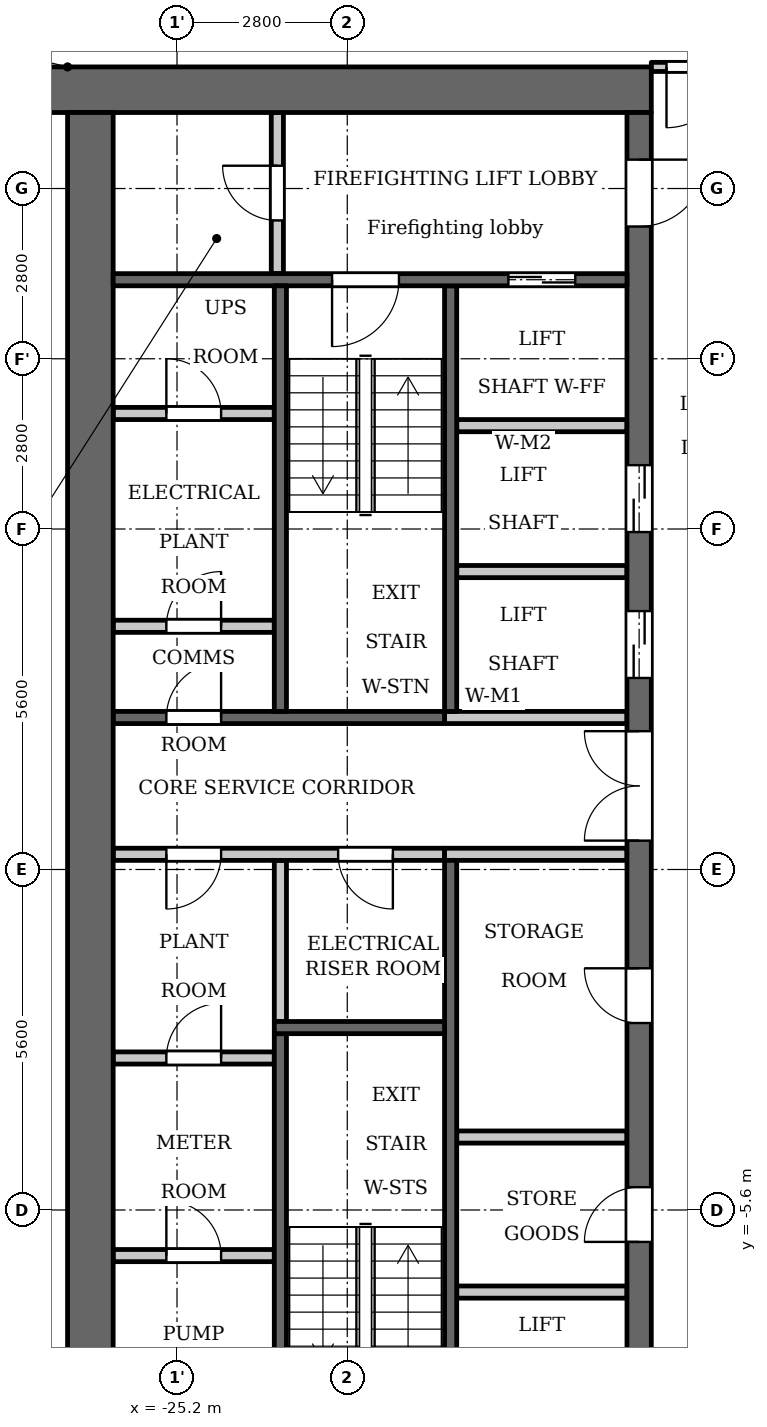
"""IFC4 building model, lengths in metres.
Left out: names, types, materials, properties, quantities, classifications, styles, units other than length and angle.
Written with IfcOpenShell. Run it as: python <this file> out.ifc"""

import sys

from ifc_helpers import new_model, si_unit, direction, frame, frame_2d, origin, place, context, subcontext, project, spatial, rectangle, extrude, element, fill, save


model = new_model("IFC4")
c1 = context("Model", 3, precision=1e-05, world=origin(), true_north=direction((0.0, 1.0)))
c2 = subcontext(c1, "Body", "Model", "MODEL_VIEW")
j1 = project(units=[si_unit("LENGTHUNIT", "METRE"), si_unit("PLANEANGLEUNIT", "RADIAN")], contexts=[c1])
p1 = place(None, origin())
s1 = spatial("IfcSite", under=j1, at=p1, CompositionType="ELEMENT")
p2 = place(p1, origin())
s2 = spatial("IfcBuilding", under=s1, at=p2, CompositionType="ELEMENT")
p3 = place(p2, frame((0.0, 0.0, 150.1)))
s3 = spatial("IfcBuildingStorey", under=s2, at=p3, CompositionType="ELEMENT", Elevation=150.1)
p4 = place(p3, frame((-23.5, -2.5, 0.0), z_axis=(0.0, 0.0, 1.0), x_axis=(0.0, 1.0, 0.0)))
e1 = element("IfcWall", 1, at=p4, inside=s3, PredefinedType="PARTITIONING", context=c2, shape_type="SweptSolid", body=[
    extrude(rectangle(XDim=2.65, YDim=0.2, at=frame_2d((1.325, 0.0))), origin(), (0.0, 0.0, 1.0), 3.2),
])
p5 = place(p3, frame((-20.7, 2.6, 0.0), z_axis=(0.0, 0.0, 1.0), x_axis=(0.0, 1.0, 0.0)))
e2 = element("IfcWall", 2, at=p5, inside=s3, PredefinedType="SHEAR", context=c2, shape_type="SweptSolid", body=[
    extrude(rectangle(XDim=7.0, YDim=0.2, at=frame_2d((3.5, 0.0))), origin(), (0.0, 0.0, 1.0), 3.2),
])
p6 = place(p3, frame((-20.7, -9.6, 0.0), z_axis=(0.0, 0.0, 1.0), x_axis=(0.0, 1.0, 0.0)))
e3 = element("IfcWall", 3, at=p6, inside=s3, PredefinedType="SHEAR", context=c2, shape_type="SweptSolid", body=[
    extrude(rectangle(XDim=9.75, YDim=0.2, at=frame_2d((4.875, 0.0))), origin(), (0.0, 0.0, 1.0), 3.2),
])
p7 = place(p3, frame((-20.8, 2.5, 0.0), z_axis=(0.0, 0.0, 1.0), x_axis=(-1.0, 0.0, 0.0)))
e4 = element("IfcWall", 4, at=p7, inside=s3, PredefinedType="SHEAR", context=c2, shape_type="SweptSolid", body=[
    extrude(rectangle(XDim=5.45, YDim=0.2, at=frame_2d((2.725, 0.0))), origin(), (0.0, 0.0, 1.0), 3.2),
])
p8 = place(p7, frame((3.675, 0.0, 0.0)))
e5 = element("IfcOpeningElement", 5, at=p8, cuts=e4, PredefinedType="OPENING", context=c2, shape_type="SweptSolid", body=[
    extrude(rectangle(XDim=0.9, YDim=2.1, at=frame_2d((0.45, 1.05))), frame((0.0, 0.11, 0.0), z_axis=(0.0, -1.0, 0.0), x_axis=(1.0, 0.0, 0.0)), (0.0, 0.0, 1.0), 0.22),
])
p9 = place(p3, frame((-20.8, 0.25, 0.0), z_axis=(0.0, 0.0, 1.0), x_axis=(-1.0, 0.0, 0.0)))
e6 = element("IfcWall", 6, at=p9, inside=s3, PredefinedType="PARTITIONING", context=c2, shape_type="SweptSolid", body=[
    extrude(rectangle(XDim=5.45, YDim=0.2, at=frame_2d((2.725, 0.0))), origin(), (0.0, 0.0, 1.0), 3.2),
])
p10 = place(p9, frame((0.85, 0.0, 0.0)))
e7 = element("IfcOpeningElement", 7, at=p10, cuts=e6, PredefinedType="OPENING", context=c2, shape_type="SweptSolid", body=[
    extrude(rectangle(XDim=0.9, YDim=2.1, at=frame_2d((0.45, 1.05))), frame((0.0, 0.11, 0.0), z_axis=(0.0, -1.0, 0.0), x_axis=(1.0, 0.0, 0.0)), (0.0, 0.0, 1.0), 0.22),
])
p11 = place(p9, frame((3.675, 0.0, 0.0)))
e8 = element("IfcOpeningElement", 8, at=p11, cuts=e6, PredefinedType="OPENING", context=c2, shape_type="SweptSolid", body=[
    extrude(rectangle(XDim=0.9, YDim=2.1, at=frame_2d((0.45, 1.05))), frame((0.0, 0.11, 0.0), z_axis=(0.0, -1.0, 0.0), x_axis=(1.0, 0.0, 0.0)), (0.0, 0.0, 1.0), 0.22),
])
p12 = place(p3, frame((-17.4, 12.825, 0.0), z_axis=(0.0, 0.0, 1.0), x_axis=(-1.0, 0.0, 0.0)))
e9 = element("IfcWall", 9, at=p12, inside=s3, PredefinedType="SHEAR", context=c2, shape_type="SweptSolid", body=[
    extrude(rectangle(XDim=10.4, YDim=0.75, at=frame_2d((5.2, 0.0))), origin(), (0.0, 0.0, 1.0), 3.2),
])
p13 = place(p3, frame((-17.8, -4.4, 0.0), z_axis=(0.0, 0.0, 1.0), x_axis=(-1.0, 0.0, 0.0)))
e10 = element("IfcWall", 10, at=p13, inside=s3, PredefinedType="PARTITIONING", context=c2, shape_type="SweptSolid", body=[
    extrude(rectangle(XDim=2.8, YDim=0.2, at=frame_2d((1.4, 0.0))), origin(), (0.0, 0.0, 1.0), 3.2),
])
p14 = place(p3, frame((-17.6, -12.45, 0.0), z_axis=(0.0, 0.0, 1.0), x_axis=(0.0, 1.0, 0.0)))
e11 = element("IfcWall", 11, at=p14, inside=s3, PredefinedType="SHEAR", context=c2, shape_type="SweptSolid", body=[
    extrude(rectangle(XDim=24.9, YDim=0.4, at=frame_2d((12.45, 0.0))), origin(), (0.0, 0.0, 1.0), 3.2),
])
p15 = place(p14, frame((6.325, 0.0, 0.0)))
e12 = element("IfcOpeningElement", 12, at=p15, cuts=e11, PredefinedType="OPENING", context=c2, shape_type="SweptSolid", body=[
    extrude(rectangle(XDim=0.9, YDim=2.1, at=frame_2d((0.45, 1.05))), frame((0.0, 0.21, 0.0), z_axis=(0.0, -1.0, 0.0), x_axis=(1.0, 0.0, 0.0)), (0.0, 0.0, 1.0), 0.42),
])
p16 = place(p14, frame((9.925, 0.0, 0.0)))
e13 = element("IfcOpeningElement", 13, at=p16, cuts=e11, PredefinedType="OPENING", context=c2, shape_type="SweptSolid", body=[
    extrude(rectangle(XDim=0.9, YDim=2.1, at=frame_2d((0.45, 1.05))), frame((0.0, 0.21, 0.0), z_axis=(0.0, -1.0, 0.0), x_axis=(1.0, 0.0, 0.0)), (0.0, 0.0, 1.0), 0.42),
])
p17 = place(p14, frame((15.6, 0.0, 0.0)))
e14 = element("IfcOpeningElement", 14, at=p17, cuts=e11, PredefinedType="OPENING", context=c2, shape_type="SweptSolid", body=[
    extrude(rectangle(XDim=1.1, YDim=2.1, at=frame_2d((0.55, 1.05))), frame((0.0, 0.21, 0.0), z_axis=(0.0, -1.0, 0.0), x_axis=(1.0, 0.0, 0.0)), (0.0, 0.0, 1.0), 0.42),
])
p18 = place(p14, frame((18.0, 0.0, 0.0)))
e15 = element("IfcOpeningElement", 15, at=p18, cuts=e11, PredefinedType="OPENING", context=c2, shape_type="SweptSolid", body=[
    extrude(rectangle(XDim=1.1, YDim=2.1, at=frame_2d((0.55, 1.05))), frame((0.0, 0.21, 0.0), z_axis=(0.0, -1.0, 0.0), x_axis=(1.0, 0.0, 0.0)), (0.0, 0.0, 1.0), 0.42),
])
p19 = place(p14, frame((23.025, 0.0, 0.0)))
e16 = element("IfcOpeningElement", 16, at=p19, cuts=e11, PredefinedType="OPENING", context=c2, shape_type="SweptSolid", body=[
    extrude(rectangle(XDim=1.1, YDim=2.1, at=frame_2d((0.55, 1.05))), frame((0.0, 0.21, 0.0), z_axis=(0.0, -1.0, 0.0), x_axis=(1.0, 0.0, 0.0)), (0.0, 0.0, 1.0), 0.42),
])
p20 = place(p14, frame((0.775, 0.0, 0.0)))
e17 = element("IfcOpeningElement", 17, at=p20, cuts=e11, PredefinedType="OPENING", context=c2, shape_type="SweptSolid", body=[
    extrude(rectangle(XDim=1.1, YDim=2.1, at=frame_2d((0.55, 1.05))), frame((0.0, 0.21, 0.0), z_axis=(0.0, -1.0, 0.0), x_axis=(1.0, 0.0, 0.0)), (0.0, 0.0, 1.0), 0.42),
])
p21 = place(p14, frame((12.925, 0.0, 0.0)))
e18 = element("IfcOpeningElement", 18, at=p21, cuts=e11, PredefinedType="OPENING", context=c2, shape_type="SweptSolid", body=[
    extrude(rectangle(XDim=1.8, YDim=2.1, at=frame_2d((0.9, 1.05))), frame((0.0, 0.21, 0.0), z_axis=(0.0, -1.0, 0.0), x_axis=(1.0, 0.0, 0.0)), (0.0, 0.0, 1.0), 0.42),
])
p22 = place(p3, frame((-26.625, -12.45, 0.0), z_axis=(0.0, 0.0, 1.0), x_axis=(0.0, 1.0, 0.0)))
e19 = element("IfcWall", 19, at=p22, inside=s3, PredefinedType="SHEAR", context=c2, shape_type="SweptSolid", body=[
    extrude(rectangle(XDim=24.9, YDim=0.75, at=frame_2d((12.45, 0.0))), origin(), (0.0, 0.0, 1.0), 3.2),
])
p23 = place(p3, frame((-23.55, 9.8, 0.0), z_axis=(0.0, 0.0, 1.0), x_axis=(0.0, 1.0, 0.0)))
e20 = element("IfcWall", 20, at=p23, inside=s3, PredefinedType="PARTITIONING", context=c2, shape_type="SweptSolid", body=[
    extrude(rectangle(XDim=2.65, YDim=0.2, at=frame_2d((1.325, 0.0))), origin(), (0.0, 0.0, 1.0), 3.2),
])
p24 = place(p23, frame((0.875, 0.0, 0.0)))
e21 = element("IfcOpeningElement", 21, at=p24, cuts=e20, PredefinedType="OPENING", context=c2, shape_type="SweptSolid", body=[
    extrude(rectangle(XDim=0.9, YDim=2.1, at=frame_2d((0.45, 1.05))), frame((0.0, 0.11, 0.0), z_axis=(0.0, -1.0, 0.0), x_axis=(1.0, 0.0, 0.0)), (0.0, 0.0, 1.0), 0.22),
])
p25 = place(p3, frame((-23.6, -6.35, 0.0), z_axis=(0.0, 0.0, 1.0), x_axis=(-1.0, 0.0, 0.0)))
e22 = element("IfcWall", 22, at=p25, inside=s3, PredefinedType="PARTITIONING", context=c2, shape_type="SweptSolid", body=[
    extrude(rectangle(XDim=2.65, YDim=0.2, at=frame_2d((1.325, 0.0))), origin(), (0.0, 0.0, 1.0), 3.2),
])
p26 = place(p25, frame((0.875, 0.0, 0.0)))
e23 = element("IfcOpeningElement", 23, at=p26, cuts=e22, PredefinedType="OPENING", context=c2, shape_type="SweptSolid", body=[
    extrude(rectangle(XDim=0.9, YDim=2.1, at=frame_2d((0.45, 1.05))), frame((0.0, 0.11, 0.0), z_axis=(0.0, -1.0, 0.0), x_axis=(1.0, 0.0, 0.0)), (0.0, 0.0, 1.0), 0.22),
])
p27 = place(p3, frame((-23.6, -3.1, 0.0), z_axis=(0.0, 0.0, 1.0), x_axis=(-1.0, 0.0, 0.0)))
e24 = element("IfcWall", 24, at=p27, inside=s3, PredefinedType="PARTITIONING", context=c2, shape_type="SweptSolid", body=[
    extrude(rectangle(XDim=2.65, YDim=0.2, at=frame_2d((1.325, 0.0))), origin(), (0.0, 0.0, 1.0), 3.2),
])
p28 = place(p27, frame((0.875, 0.0, 0.0)))
e25 = element("IfcOpeningElement", 25, at=p28, cuts=e24, PredefinedType="OPENING", context=c2, shape_type="SweptSolid", body=[
    extrude(rectangle(XDim=0.9, YDim=2.1, at=frame_2d((0.45, 1.05))), frame((0.0, 0.11, 0.0), z_axis=(0.0, -1.0, 0.0), x_axis=(1.0, 0.0, 0.0)), (0.0, 0.0, 1.0), 0.22),
])
p29 = place(p3, frame((-23.6, 4.0, 0.0), z_axis=(0.0, 0.0, 1.0), x_axis=(-1.0, 0.0, 0.0)))
e26 = element("IfcWall", 26, at=p29, inside=s3, PredefinedType="PARTITIONING", context=c2, shape_type="SweptSolid", body=[
    extrude(rectangle(XDim=2.65, YDim=0.2, at=frame_2d((1.325, 0.0))), origin(), (0.0, 0.0, 1.0), 3.2),
])
p30 = place(p29, frame((0.875, 0.0, 0.0)))
e27 = element("IfcOpeningElement", 27, at=p30, cuts=e26, PredefinedType="OPENING", context=c2, shape_type="SweptSolid", body=[
    extrude(rectangle(XDim=0.9, YDim=2.1, at=frame_2d((0.45, 1.05))), frame((0.0, 0.11, 0.0), z_axis=(0.0, -1.0, 0.0), x_axis=(1.0, 0.0, 0.0)), (0.0, 0.0, 1.0), 0.22),
])
p31 = place(p3, frame((-23.6, 7.5, 0.0), z_axis=(0.0, 0.0, 1.0), x_axis=(-1.0, 0.0, 0.0)))
e28 = element("IfcWall", 28, at=p31, inside=s3, PredefinedType="PARTITIONING", context=c2, shape_type="SweptSolid", body=[
    extrude(rectangle(XDim=2.65, YDim=0.2, at=frame_2d((1.325, 0.0))), origin(), (0.0, 0.0, 1.0), 3.2),
])
p32 = place(p31, frame((0.875, 0.0, 0.0)))
e29 = element("IfcOpeningElement", 29, at=p32, cuts=e28, PredefinedType="OPENING", context=c2, shape_type="SweptSolid", body=[
    extrude(rectangle(XDim=0.9, YDim=2.1, at=frame_2d((0.45, 1.05))), frame((0.0, 0.11, 0.0), z_axis=(0.0, -1.0, 0.0), x_axis=(1.0, 0.0, 0.0)), (0.0, 0.0, 1.0), 0.22),
])
p33 = place(p3, frame((-17.8, -6.95, 0.0), z_axis=(0.0, 0.0, 1.0), x_axis=(-1.0, 0.0, 0.0)))
e30 = element("IfcWall", 30, at=p33, inside=s3, PredefinedType="PARTITIONING", context=c2, shape_type="SweptSolid", body=[
    extrude(rectangle(XDim=2.8, YDim=0.2, at=frame_2d((1.4, 0.0))), origin(), (0.0, 0.0, 1.0), 3.2),
])
for number, where, z_axis, x_axis in (
    (31, (-17.8, 0.25, 0.0), (0.0, 0.0, 1.0), (-1.0, 0.0, 0.0)),
    (32, (-17.8, 2.5, 0.0), (0.0, 0.0, 1.0), (-1.0, 0.0, 0.0)),
):
    element("IfcWall", number, at=place(p3, frame(where, z_axis=z_axis, x_axis=x_axis)), inside=s3, PredefinedType="PARTITIONING", context=c2, shape_type="SweptSolid", body=[
        extrude(rectangle(XDim=3.0, YDim=0.2, at=frame_2d((1.5, 0.0))), origin(), (0.0, 0.0, 1.0), 3.2),
    ])
for number, where, z_axis, x_axis in (
    (33, (-17.8, 4.9, 0.0), (0.0, 0.0, 1.0), (-1.0, 0.0, 0.0)),
    (34, (-17.8, 7.3, 0.0), (0.0, 0.0, 1.0), (-1.0, 0.0, 0.0)),
):
    element("IfcWall", number, at=place(p3, frame(where, z_axis=z_axis, x_axis=x_axis)), inside=s3, PredefinedType="PARTITIONING", context=c2, shape_type="SweptSolid", body=[
        extrude(rectangle(XDim=2.8, YDim=0.2, at=frame_2d((1.4, 0.0))), origin(), (0.0, 0.0, 1.0), 3.2),
    ])
p34 = place(p3, frame((-17.8, 9.7, 0.0), z_axis=(0.0, 0.0, 1.0), x_axis=(-1.0, 0.0, 0.0)))
e35 = element("IfcWall", 35, at=p34, inside=s3, PredefinedType="SHEAR", context=c2, shape_type="SweptSolid", body=[
    extrude(rectangle(XDim=8.45, YDim=0.2, at=frame_2d((4.225, 0.0))), origin(), (0.0, 0.0, 1.0), 3.2),
])
p35 = place(p34, frame((0.85, 0.0, 0.0)))
e36 = element("IfcOpeningElement", 36, at=p35, cuts=e35, PredefinedType="OPENING", context=c2, shape_type="SweptSolid", body=[
    extrude(rectangle(XDim=1.1, YDim=2.1, at=frame_2d((0.55, 1.05))), frame((0.0, 0.11, 0.0), z_axis=(0.0, -1.0, 0.0), x_axis=(1.0, 0.0, 0.0)), (0.0, 0.0, 1.0), 0.22),
])
p36 = place(p34, frame((3.75, 0.0, 0.0)))
e37 = element("IfcOpeningElement", 37, at=p36, cuts=e35, PredefinedType="OPENING", context=c2, shape_type="SweptSolid", body=[
    extrude(rectangle(XDim=1.1, YDim=2.1, at=frame_2d((0.55, 1.05))), frame((0.0, 0.11, 0.0), z_axis=(0.0, -1.0, 0.0), x_axis=(1.0, 0.0, 0.0)), (0.0, 0.0, 1.0), 0.22),
])
p37 = place(p3, frame((-23.5, 2.6, 0.0), z_axis=(0.0, 0.0, 1.0), x_axis=(0.0, 1.0, 0.0)))
e38 = element("IfcWall", 38, at=p37, inside=s3, PredefinedType="SHEAR", context=c2, shape_type="SweptSolid", body=[
    extrude(rectangle(XDim=7.0, YDim=0.2, at=frame_2d((3.5, 0.0))), origin(), (0.0, 0.0, 1.0), 3.2),
])
p38 = place(p3, frame((-23.5, -9.6, 0.0), z_axis=(0.0, 0.0, 1.0), x_axis=(0.0, 1.0, 0.0)))
e39 = element("IfcWall", 39, at=p38, inside=s3, PredefinedType="SHEAR", context=c2, shape_type="SweptSolid", body=[
    extrude(rectangle(XDim=6.9, YDim=0.2, at=frame_2d((3.45, 0.0))), origin(), (0.0, 0.0, 1.0), 3.2),
])
p39 = place(p3, frame((-20.8, -2.6, 0.0), z_axis=(0.0, 0.0, 1.0), x_axis=(-1.0, 0.0, 0.0)))
e40 = element("IfcWall", 40, at=p39, inside=s3, PredefinedType="SHEAR", context=c2, shape_type="SweptSolid", body=[
    extrude(rectangle(XDim=2.8, YDim=0.2, at=frame_2d((1.4, 0.0))), origin(), (0.0, 0.0, 1.0), 3.2),
])
p40 = place(p3, frame((-17.4, 13.2, 0.0), z_axis=(0.0, 0.0, 1.0), x_axis=(1.0, 0.0, 0.0)))
e41 = element("IfcWall", 41, at=p40, inside=s3, PredefinedType="PARTITIONING", context=c2, shape_type="SweptSolid", body=[
    extrude(rectangle(XDim=34.8, YDim=0.15, at=frame_2d((17.4, 0.0))), origin(), (0.0, 0.0, 1.0), 3.2),
])
p41 = place(p40, frame((0.25, 0.0, 0.0)))
e42 = element("IfcOpeningElement", 42, at=p41, cuts=e41, PredefinedType="OPENING", context=c2, shape_type="SweptSolid", body=[
    extrude(rectangle(XDim=1.0, YDim=2.1, at=frame_2d((0.5, 1.05))), frame((0.0, 0.085, 0.0), z_axis=(0.0, -1.0, 0.0), x_axis=(1.0, 0.0, 0.0)), (0.0, 0.0, 1.0), 0.17),
])
p42 = place(p40, frame((33.65, 0.0, 0.0)))
e43 = element("IfcOpeningElement", 43, at=p42, cuts=e41, PredefinedType="OPENING", context=c2, shape_type="SweptSolid", body=[
    extrude(rectangle(XDim=1.0, YDim=2.1, at=frame_2d((0.5, 1.05))), frame((0.0, 0.085, 0.0), z_axis=(0.0, -1.0, 0.0), x_axis=(1.0, 0.0, 0.0)), (0.0, 0.0, 1.0), 0.17),
])
p43 = place(p40, frame((13.75, 0.0, 0.0)))
e44 = element("IfcOpeningElement", 44, at=p43, cuts=e41, PredefinedType="OPENING", context=c2, shape_type="SweptSolid", body=[
    extrude(rectangle(XDim=1.0, YDim=2.1, at=frame_2d((0.5, 1.05))), frame((0.0, 0.085, 0.0), z_axis=(0.0, -1.0, 0.0), x_axis=(1.0, 0.0, 0.0)), (0.0, 0.0, 1.0), 0.17),
])
p44 = place(p15, origin())
e45 = element("IfcDoor", 45, at=p44, inside=s3, OperationType="SINGLE_SWING_RIGHT", PredefinedType="DOOR", context=c2, shape_type="SweptSolid", body=[
    extrude(rectangle(XDim=0.9, YDim=2.1, at=frame_2d((0.45, 1.05))), frame((0.0, 0.025, 0.0), z_axis=(0.0, -1.0, 0.0), x_axis=(1.0, 0.0, 0.0)), (0.0, 0.0, 1.0), 0.05),
])
fill(e12, e45)
p45 = place(p16, origin())
e46 = element("IfcDoor", 46, at=p45, inside=s3, OperationType="SINGLE_SWING_LEFT", PredefinedType="DOOR", context=c2, shape_type="SweptSolid", body=[
    extrude(rectangle(XDim=0.9, YDim=2.1, at=frame_2d((0.45, 1.05))), frame((0.0, 0.025, 0.0), z_axis=(0.0, -1.0, 0.0), x_axis=(1.0, 0.0, 0.0)), (0.0, 0.0, 1.0), 0.05),
])
fill(e13, e46)
p46 = place(p17, origin())
e47 = element("IfcDoor", 47, at=p46, inside=s3, OperationType="DOUBLE_DOOR_SLIDING", PredefinedType="DOOR", context=c2, shape_type="SweptSolid", body=[
    extrude(rectangle(XDim=1.1, YDim=2.1, at=frame_2d((0.55, 1.05))), frame((0.0, 0.025, 0.0), z_axis=(0.0, -1.0, 0.0), x_axis=(1.0, 0.0, 0.0)), (0.0, 0.0, 1.0), 0.05),
])
fill(e14, e47)
p47 = place(p18, origin())
e48 = element("IfcDoor", 48, at=p47, inside=s3, OperationType="DOUBLE_DOOR_SLIDING", PredefinedType="DOOR", context=c2, shape_type="SweptSolid", body=[
    extrude(rectangle(XDim=1.1, YDim=2.1, at=frame_2d((0.55, 1.05))), frame((0.0, 0.025, 0.0), z_axis=(0.0, -1.0, 0.0), x_axis=(1.0, 0.0, 0.0)), (0.0, 0.0, 1.0), 0.05),
])
fill(e15, e48)
p48 = place(p35, origin())
e49 = element("IfcDoor", 49, at=p48, inside=s3, OperationType="DOUBLE_DOOR_SLIDING", PredefinedType="DOOR", context=c2, shape_type="SweptSolid", body=[
    extrude(rectangle(XDim=1.1, YDim=2.1, at=frame_2d((0.55, 1.05))), frame((0.0, 0.025, 0.0), z_axis=(0.0, -1.0, 0.0), x_axis=(1.0, 0.0, 0.0)), (0.0, 0.0, 1.0), 0.05),
])
fill(e36, e49)
p49 = place(p19, origin())
e50 = element("IfcDoor", 50, at=p49, inside=s3, OperationType="SINGLE_SWING_RIGHT", PredefinedType="DOOR", context=c2, shape_type="SweptSolid", body=[
    extrude(rectangle(XDim=1.1, YDim=2.1, at=frame_2d((0.55, 1.05))), frame((0.0, 0.025, 0.0), z_axis=(0.0, -1.0, 0.0), x_axis=(1.0, 0.0, 0.0)), (0.0, 0.0, 1.0), 0.05),
])
fill(e16, e50)
p50 = place(p24, origin())
e51 = element("IfcDoor", 51, at=p50, inside=s3, OperationType="SINGLE_SWING_LEFT", PredefinedType="DOOR", context=c2, shape_type="SweptSolid", body=[
    extrude(rectangle(XDim=0.9, YDim=2.1, at=frame_2d((0.45, 1.05))), frame((0.0, 0.025, 0.0), z_axis=(0.0, -1.0, 0.0), x_axis=(1.0, 0.0, 0.0)), (0.0, 0.0, 1.0), 0.05),
])
fill(e21, e51)
p51 = place(p36, origin())
e52 = element("IfcDoor", 52, at=p51, inside=s3, OperationType="SINGLE_SWING_LEFT", PredefinedType="DOOR", context=c2, shape_type="SweptSolid", body=[
    extrude(rectangle(XDim=1.1, YDim=2.1, at=frame_2d((0.55, 1.05))), frame((0.0, 0.025, 0.0), z_axis=(0.0, -1.0, 0.0), x_axis=(1.0, 0.0, 0.0)), (0.0, 0.0, 1.0), 0.05),
])
fill(e37, e52)
p52 = place(p21, origin())
e53 = element("IfcDoor", 53, at=p52, inside=s3, OperationType="DOUBLE_DOOR_SINGLE_SWING", PredefinedType="DOOR", context=c2, shape_type="SweptSolid", body=[
    extrude(rectangle(XDim=1.8, YDim=2.1, at=frame_2d((0.9, 1.05))), frame((0.0, 0.025, 0.0), z_axis=(0.0, -1.0, 0.0), x_axis=(1.0, 0.0, 0.0)), (0.0, 0.0, 1.0), 0.05),
])
fill(e18, e53)
p53 = place(p10, origin())
e54 = element("IfcDoor", 54, at=p53, inside=s3, OperationType="SINGLE_SWING_RIGHT", PredefinedType="DOOR", context=c2, shape_type="SweptSolid", body=[
    extrude(rectangle(XDim=0.9, YDim=2.1, at=frame_2d((0.45, 1.05))), frame((0.0, 0.025, 0.0), z_axis=(0.0, -1.0, 0.0), x_axis=(1.0, 0.0, 0.0)), (0.0, 0.0, 1.0), 0.05),
])
fill(e7, e54)
p54 = place(p26, origin())
e55 = element("IfcDoor", 55, at=p54, inside=s3, OperationType="SINGLE_SWING_RIGHT", PredefinedType="DOOR", context=c2, shape_type="SweptSolid", body=[
    extrude(rectangle(XDim=0.9, YDim=2.1, at=frame_2d((0.45, 1.05))), frame((0.0, 0.025, 0.0), z_axis=(0.0, -1.0, 0.0), x_axis=(1.0, 0.0, 0.0)), (0.0, 0.0, 1.0), 0.05),
])
fill(e23, e55)
p55 = place(p28, origin())
e56 = element("IfcDoor", 56, at=p55, inside=s3, OperationType="SINGLE_SWING_LEFT", PredefinedType="DOOR", context=c2, shape_type="SweptSolid", body=[
    extrude(rectangle(XDim=0.9, YDim=2.1, at=frame_2d((0.45, 1.05))), frame((0.0, 0.025, 0.0), z_axis=(0.0, -1.0, 0.0), x_axis=(1.0, 0.0, 0.0)), (0.0, 0.0, 1.0), 0.05),
])
fill(e25, e56)
p56 = place(p11, origin())
e57 = element("IfcDoor", 57, at=p56, inside=s3, OperationType="SINGLE_SWING_LEFT", PredefinedType="DOOR", context=c2, shape_type="SweptSolid", body=[
    extrude(rectangle(XDim=0.9, YDim=2.1, at=frame_2d((0.45, 1.05))), frame((0.0, 0.025, 0.0), z_axis=(0.0, -1.0, 0.0), x_axis=(1.0, 0.0, 0.0)), (0.0, 0.0, 1.0), 0.05),
])
fill(e8, e57)
p57 = place(p30, origin())
e58 = element("IfcDoor", 58, at=p57, inside=s3, OperationType="SINGLE_SWING_LEFT", PredefinedType="DOOR", context=c2, shape_type="SweptSolid", body=[
    extrude(rectangle(XDim=0.9, YDim=2.1, at=frame_2d((0.45, 1.05))), frame((0.0, 0.025, 0.0), z_axis=(0.0, -1.0, 0.0), x_axis=(1.0, 0.0, 0.0)), (0.0, 0.0, 1.0), 0.05),
])
fill(e27, e58)
p58 = place(p32, origin())
e59 = element("IfcDoor", 59, at=p58, inside=s3, OperationType="SINGLE_SWING_RIGHT", PredefinedType="DOOR", context=c2, shape_type="SweptSolid", body=[
    extrude(rectangle(XDim=0.9, YDim=2.1, at=frame_2d((0.45, 1.05))), frame((0.0, 0.025, 0.0), z_axis=(0.0, -1.0, 0.0), x_axis=(1.0, 0.0, 0.0)), (0.0, 0.0, 1.0), 0.05),
])
fill(e29, e59)
p59 = place(p8, origin())
e60 = element("IfcDoor", 60, at=p59, inside=s3, OperationType="SINGLE_SWING_LEFT", PredefinedType="DOOR", context=c2, shape_type="SweptSolid", body=[
    extrude(rectangle(XDim=0.9, YDim=2.1, at=frame_2d((0.45, 1.05))), frame((0.0, 0.025, 0.0), z_axis=(0.0, -1.0, 0.0), x_axis=(1.0, 0.0, 0.0)), (0.0, 0.0, 1.0), 0.05),
])
fill(e5, e60)
p60 = place(p41, origin())
e61 = element("IfcDoor", 61, at=p60, inside=s3, OperationType="SINGLE_SWING_LEFT", PredefinedType="DOOR", context=c2, shape_type="SweptSolid", body=[
    extrude(rectangle(XDim=1.0, YDim=2.1, at=frame_2d((0.5, 1.05))), frame((0.0, 0.025, 0.0), z_axis=(0.0, -1.0, 0.0), x_axis=(1.0, 0.0, 0.0)), (0.0, 0.0, 1.0), 0.05),
])
fill(e42, e61)
save(model, sys.argv[1])
